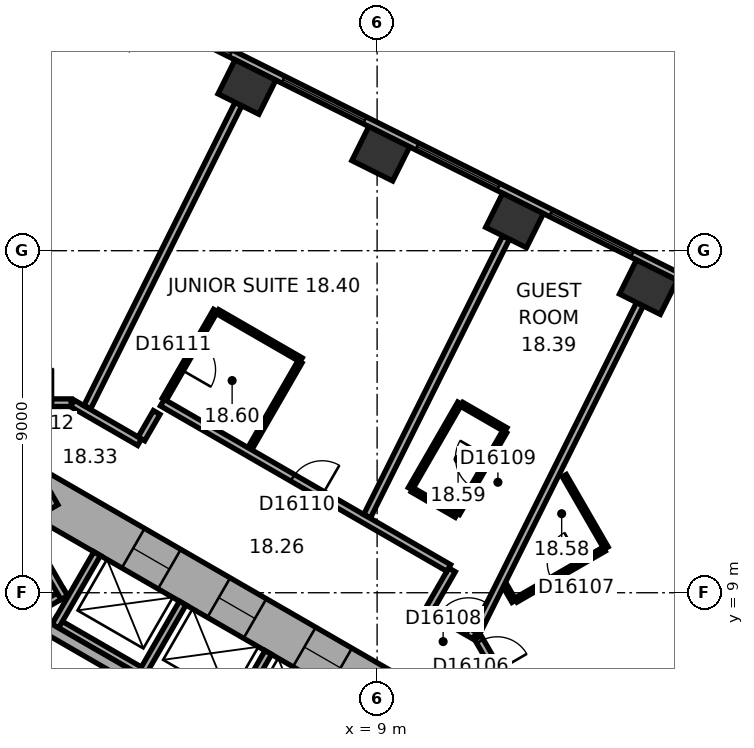
"""IFC4 building model, lengths in metres.
Left out: names, types, materials, properties, quantities, classifications, styles, units other than length and angle.
Written with IfcOpenShell. Run it as: python <this file> out.ifc"""

import sys

from ifc_helpers import new_model, si_unit, direction, frame, frame_2d, origin, origin_2d, place, context, subcontext, project, spatial, rectangle, extrude, element, fill, save


model = new_model("IFC4")
c1 = context("Model", 3, precision=1e-05, world=origin(), true_north=direction((0.0, 1.0)))
c2 = subcontext(c1, "Body", "Model", "MODEL_VIEW")
j1 = project(units=[si_unit("LENGTHUNIT", "METRE"), si_unit("PLANEANGLEUNIT", "RADIAN")], contexts=[c1])
p1 = place(None, origin())
s1 = spatial("IfcSite", under=j1, at=p1, CompositionType="ELEMENT")
p2 = place(p1, origin())
s2 = spatial("IfcBuilding", under=s1, at=p2, CompositionType="ELEMENT")
p3 = place(p2, frame((0.0, 0.0, 83.6)))
s3 = spatial("IfcBuildingStorey", under=s2, at=p3, CompositionType="ELEMENT", Elevation=83.6)
for number, where, z_axis, x_axis in (
    (1, (16.138, 17.04, 0.0), (0.0, 0.0, 1.0), (-0.895, 0.446, 0.0)),
    (2, (12.616, 18.795, 0.0), (0.0, 0.0, 1.0), (-0.895, 0.446, 0.0)),
    (3, (9.095, 20.551, 0.0), (0.0, 0.0, 1.0), (-0.895, 0.446, 0.0)),
    (4, (5.574, 22.306, 0.0), (0.0, 0.0, 1.0), (-0.895, 0.446, 0.0)),
):
    element("IfcColumn", number, at=place(p3, frame(where, z_axis=z_axis, x_axis=x_axis)), inside=s3, PredefinedType="COLUMN", context=c2, shape_type="SweptSolid", body=[
        extrude(rectangle(XDim=1.2, YDim=1.0, at=origin_2d()), origin(), (0.0, 0.0, 1.0), 3.3),
    ])
p4 = place(p3, frame((10.4, 5.658, 0.0), z_axis=(0.0, 0.0, 1.0), x_axis=(-0.866021384402, 0.500006961711, 0.0)))
e5 = element("IfcWall", 5, at=p4, inside=s3, PredefinedType="SHEAR", context=c2, shape_type="SweptSolid", body=[
    extrude(rectangle(XDim=12.355, YDim=1.2, at=frame_2d((6.178, 0.0))), origin(), (0.0, 0.0, 1.0), 3.3),
])
p5 = place(p4, frame((2.728, 0.0, 0.0)))
e6 = element("IfcOpeningElement", 6, at=p5, cuts=e5, PredefinedType="OPENING", context=c2, shape_type="SweptSolid", body=[
    extrude(rectangle(XDim=1.1, YDim=2.1, at=frame_2d((0.55, 1.05))), frame((0.0, 0.61, 0.0), z_axis=(0.0, -1.0, 0.0), x_axis=(1.0, 0.0, 0.0)), (0.0, 0.0, 1.0), 1.22),
])
p6 = place(p4, frame((5.328, 0.0, 0.0)))
e7 = element("IfcOpeningElement", 7, at=p6, cuts=e5, PredefinedType="OPENING", context=c2, shape_type="SweptSolid", body=[
    extrude(rectangle(XDim=1.1, YDim=2.1, at=frame_2d((0.55, 1.05))), frame((0.0, 0.61, 0.0), z_axis=(0.0, -1.0, 0.0), x_axis=(1.0, 0.0, 0.0)), (0.0, 0.0, 1.0), 1.22),
])
p7 = place(p4, frame((7.928, 0.0, 0.0)))
e8 = element("IfcOpeningElement", 8, at=p7, cuts=e5, PredefinedType="OPENING", context=c2, shape_type="SweptSolid", body=[
    extrude(rectangle(XDim=1.1, YDim=2.1, at=frame_2d((0.55, 1.05))), frame((0.0, 0.61, 0.0), z_axis=(0.0, -1.0, 0.0), x_axis=(1.0, 0.0, 0.0)), (0.0, 0.0, 1.0), 1.22),
])
p8 = place(p3, frame((0.3, 11.836, 0.0), z_axis=(0.0, 0.0, 1.0), x_axis=(-0.866021384402, -0.500006961711, 0.0)))
e9 = element("IfcWall", 9, at=p8, inside=s3, PredefinedType="SHEAR", context=c2, shape_type="SweptSolid", body=[
    extrude(rectangle(XDim=12.355, YDim=1.2, at=frame_2d((6.178, 0.0))), origin(), (0.0, 0.0, 1.0), 3.3),
])
p9 = place(p8, frame((6.378, 0.0, 0.0)))
e10 = element("IfcOpeningElement", 10, at=p9, cuts=e9, PredefinedType="OPENING", context=c2, shape_type="SweptSolid", body=[
    extrude(rectangle(XDim=1.5, YDim=2.1, at=frame_2d((0.75, 1.05))), frame((0.0, 0.61, 0.0), z_axis=(0.0, -1.0, 0.0), x_axis=(1.0, 0.0, 0.0)), (0.0, 0.0, 1.0), 1.22),
])
p10 = place(p8, frame((1.828, 0.0, 0.0)))
e11 = element("IfcOpeningElement", 11, at=p10, cuts=e9, PredefinedType="OPENING", context=c2, shape_type="SweptSolid", body=[
    extrude(rectangle(XDim=1.1, YDim=2.1, at=frame_2d((0.55, 1.05))), frame((0.0, 0.61, 0.0), z_axis=(0.0, -1.0, 0.0), x_axis=(1.0, 0.0, 0.0)), (0.0, 0.0, 1.0), 1.22),
])
p11 = place(p3, frame((20.63, 15.47, 0.0), z_axis=(0.0, 0.0, 1.0), x_axis=(-0.894934518609, 0.446197498203, 0.0)))
e12 = element("IfcWall", 12, at=p11, inside=s3, PredefinedType="STANDARD", context=c2, shape_type="SweptSolid", body=[
    extrude(rectangle(XDim=21.246, YDim=0.2, at=frame_2d((10.623, 0.0))), origin(), (0.0, 0.0, 1.0), 3.3),
])
p12 = place(p11, frame((1.553, 0.0, 0.8)))
e13 = element("IfcOpeningElement", 13, at=p12, cuts=e12, PredefinedType="OPENING", context=c2, shape_type="SweptSolid", body=[
    extrude(rectangle(XDim=2.4, YDim=1.7, at=frame_2d((1.2, 0.85))), frame((0.0, 0.11, 0.0), z_axis=(0.0, -1.0, 0.0), x_axis=(1.0, 0.0, 0.0)), (0.0, 0.0, 1.0), 0.22),
])
p13 = place(p11, frame((5.488, 0.0, 0.8)))
e14 = element("IfcOpeningElement", 14, at=p13, cuts=e12, PredefinedType="OPENING", context=c2, shape_type="SweptSolid", body=[
    extrude(rectangle(XDim=2.4, YDim=1.7, at=frame_2d((1.2, 0.85))), frame((0.0, 0.11, 0.0), z_axis=(0.0, -1.0, 0.0), x_axis=(1.0, 0.0, 0.0)), (0.0, 0.0, 1.0), 0.22),
])
p14 = place(p11, frame((9.422, 0.0, 0.8)))
e15 = element("IfcOpeningElement", 15, at=p14, cuts=e12, PredefinedType="OPENING", context=c2, shape_type="SweptSolid", body=[
    extrude(rectangle(XDim=2.4, YDim=1.7, at=frame_2d((1.2, 0.85))), frame((0.0, 0.11, 0.0), z_axis=(0.0, -1.0, 0.0), x_axis=(1.0, 0.0, 0.0)), (0.0, 0.0, 1.0), 0.22),
])
p15 = place(p11, frame((13.357, 0.0, 0.8)))
e16 = element("IfcOpeningElement", 16, at=p15, cuts=e12, PredefinedType="OPENING", context=c2, shape_type="SweptSolid", body=[
    extrude(rectangle(XDim=2.4, YDim=1.7, at=frame_2d((1.2, 0.85))), frame((0.0, 0.11, 0.0), z_axis=(0.0, -1.0, 0.0), x_axis=(1.0, 0.0, 0.0)), (0.0, 0.0, 1.0), 0.22),
])
p16 = place(p11, frame((17.292, 0.0, 0.8)))
e17 = element("IfcOpeningElement", 17, at=p16, cuts=e12, PredefinedType="OPENING", context=c2, shape_type="SweptSolid", body=[
    extrude(rectangle(XDim=2.4, YDim=1.7, at=frame_2d((1.2, 0.85))), frame((0.0, 0.11, 0.0), z_axis=(0.0, -1.0, 0.0), x_axis=(1.0, 0.0, 0.0)), (0.0, 0.0, 1.0), 0.22),
])
p17 = place(p3, frame((7.424, 4.259, 0.0), z_axis=(0.0, 0.0, 1.0), x_axis=(-0.866026010844, 0.49999894854, 0.0)))
e18 = element("IfcWall", 18, at=p17, inside=s3, PredefinedType="PARTITIONING", context=c2, shape_type="SweptSolid", body=[
    extrude(rectangle(XDim=8.0, YDim=0.2, at=frame_2d((4.0, 0.0))), origin(), (0.0, 0.0, 1.0), 3.05),
])
for number, where, z_axis, x_axis in (
    (19, (5.036, 5.522, 0.0), (0.0, 0.0, 1.0), (0.5, 0.866, 0.0)),
    (20, (2.784, 6.822, 0.0), (0.0, 0.0, 1.0), (0.5, 0.866, 0.0)),
    (21, (0.532, 8.122, 0.0), (0.0, 0.0, 1.0), (0.5, 0.866, 0.0)),
):
    element("IfcWall", number, at=place(p3, frame(where, z_axis=z_axis, x_axis=x_axis)), inside=s3, PredefinedType="PARTITIONING", context=c2, shape_type="SweptSolid", body=[
        extrude(rectangle(XDim=2.2, YDim=0.2, at=frame_2d((1.1, 0.0))), origin(), (0.0, 0.0, 1.0), 3.05),
    ])
p18 = place(p3, frame((0.803, 9.009, 0.0), z_axis=(0.0, 0.0, 1.0), x_axis=(-0.866028230842, -0.499995103361, 0.0)))
e22 = element("IfcWall", 22, at=p18, inside=s3, PredefinedType="PARTITIONING", context=c2, shape_type="SweptSolid", body=[
    extrude(rectangle(XDim=5.4, YDim=0.2, at=frame_2d((2.7, 0.0))), origin(), (0.0, 0.0, 1.0), 3.05),
])
p19 = place(p3, frame((0.767, 8.872, 0.0), z_axis=(0.0, 0.0, 1.0), x_axis=(-0.499994660107, 0.866028486751, 0.0)))
e23 = element("IfcWall", 23, at=p19, inside=s3, PredefinedType="PARTITIONING", context=c2, shape_type="SweptSolid", body=[
    extrude(rectangle(XDim=2.2, YDim=0.2, at=frame_2d((1.1, 0.0))), origin(), (0.0, 0.0, 1.0), 3.05),
])
p20 = place(p3, frame((6.303, 4.617, 0.0), z_axis=(0.0, 0.0, 1.0), x_axis=(-0.866027801685, 0.499995846692, 0.0)))
e24 = element("IfcWall", 24, at=p20, inside=s3, PredefinedType="SHEAR", context=c2, shape_type="SweptSolid", body=[
    extrude(rectangle(XDim=7.06, YDim=0.3, at=frame_2d((3.53, 0.0))), origin(), (0.0, 0.0, 1.0), 3.05),
])
p21 = place(p3, frame((0.95, 14.001, 0.0), z_axis=(0.0, 0.0, 1.0), x_axis=(-1.0, 0.0, 0.0)))
e25 = element("IfcWall", 25, at=p21, inside=s3, PredefinedType="PARTITIONING", context=c2, shape_type="SweptSolid", body=[
    extrude(rectangle(XDim=1.86, YDim=0.2, at=frame_2d((0.93, 0.0))), origin(), (0.0, 0.0, 1.0), 3.05),
])
p22 = place(p21, frame((0.48, 0.0, 0.0)))
e26 = element("IfcOpeningElement", 26, at=p22, cuts=e25, PredefinedType="OPENING", context=c2, shape_type="SweptSolid", body=[
    extrude(rectangle(XDim=0.9, YDim=2.1, at=frame_2d((0.45, 1.05))), frame((0.0, 0.11, 0.0), z_axis=(0.0, -1.0, 0.0), x_axis=(1.0, 0.0, 0.0)), (0.0, 0.0, 1.0), 0.22),
])
p23 = place(p3, frame((2.748, 12.962, 0.0), z_axis=(0.0, 0.0, 1.0), x_axis=(-0.866013897511, 0.50001992892, 0.0)))
e27 = element("IfcWall", 27, at=p23, inside=s3, PredefinedType="PARTITIONING", context=c2, shape_type="SweptSolid", body=[
    extrude(rectangle(XDim=2.037, YDim=0.2, at=frame_2d((1.018, 0.0))), origin(), (0.0, 0.0, 1.0), 3.05),
])
p24 = place(p3, frame((3.199, 13.743, 0.0), z_axis=(0.0, 0.0, 1.0), x_axis=(-0.500170954823, -0.865926680471, 0.0)))
e28 = element("IfcWall", 28, at=p24, inside=s3, PredefinedType="PARTITIONING", context=c2, shape_type="SweptSolid", body=[
    extrude(rectangle(XDim=0.801, YDim=0.2, at=frame_2d((0.4, 0.0))), origin(), (0.0, 0.0, 1.0), 3.05),
])
p25 = place(p3, frame((3.399, 14.089, 0.0), z_axis=(0.0, 0.0, 1.0), x_axis=(0.4999416173, 0.866059108428, 0.0)))
e29 = element("IfcWall", 29, at=p25, inside=s3, PredefinedType="PARTITIONING", context=c2, shape_type="SweptSolid", body=[
    extrude(rectangle(XDim=2.7, YDim=0.12, at=frame_2d((1.35, 0.0))), origin(), (0.0, 0.0, 1.0), 3.05),
])
p26 = place(p25, frame((0.9, 0.0, 0.0)))
e30 = element("IfcOpeningElement", 30, at=p26, cuts=e29, PredefinedType="OPENING", context=c2, shape_type="SweptSolid", body=[
    extrude(rectangle(XDim=0.9, YDim=2.1, at=frame_2d((0.45, 1.05))), frame((0.0, 0.07, 0.0), z_axis=(0.0, -1.0, 0.0), x_axis=(1.0, 0.0, 0.0)), (0.0, 0.0, 1.0), 0.14),
])
p27 = place(p3, frame((4.801, 16.397, 0.0), z_axis=(0.0, 0.0, 1.0), x_axis=(0.866022320763, -0.500005339912, 0.0)))
e31 = element("IfcWall", 31, at=p27, inside=s3, PredefinedType="PARTITIONING", context=c2, shape_type="SweptSolid", body=[
    extrude(rectangle(XDim=2.54, YDim=0.12, at=frame_2d((1.27, 0.0))), origin(), (0.0, 0.0, 1.0), 3.05),
])
p28 = place(p3, frame((5.351, 21.859, 0.0), z_axis=(0.0, 0.0, 1.0), x_axis=(-0.446205309328, -0.894930624086, 0.0)))
e32 = element("IfcWall", 32, at=p28, inside=s3, PredefinedType="PARTITIONING", context=c2, shape_type="SweptSolid", body=[
    extrude(rectangle(XDim=8.913, YDim=0.2, at=frame_2d((4.457, 0.0))), origin(), (0.0, 0.0, 1.0), 2.6),
])
p29 = place(p3, frame((6.971, 15.075, 0.0), z_axis=(0.0, 0.0, 1.0), x_axis=(-0.500007957085, -0.86602080971, 0.0)))
e33 = element("IfcWall", 33, at=p29, inside=s3, PredefinedType="PARTITIONING", context=c2, shape_type="SweptSolid", body=[
    extrude(rectangle(XDim=2.64, YDim=0.12, at=frame_2d((1.32, 0.0))), origin(), (0.0, 0.0, 1.0), 3.05),
])
p30 = place(p3, frame((9.875, 11.736, 0.0), z_axis=(0.0, 0.0, 1.0), x_axis=(0.499936506574, 0.866062058628, 0.0)))
e34 = element("IfcWall", 34, at=p30, inside=s3, PredefinedType="PARTITIONING", context=c2, shape_type="SweptSolid", body=[
    extrude(rectangle(XDim=2.6, YDim=0.12, at=frame_2d((1.3, 0.0))), origin(), (0.0, 0.0, 1.0), 3.05),
])
p31 = place(p3, frame((10.371, 8.561, 0.0), z_axis=(0.0, 0.0, 1.0), x_axis=(0.499986357472, 0.866033280158, 0.0)))
e35 = element("IfcWall", 35, at=p31, inside=s3, PredefinedType="PARTITIONING", context=c2, shape_type="SweptSolid", body=[
    extrude(rectangle(XDim=1.201, YDim=0.2, at=frame_2d((0.601, 0.0))), origin(), (0.0, 0.0, 1.0), 3.05),
])
p32 = place(p3, frame((10.885, 9.652, 0.0), z_axis=(0.0, 0.0, 1.0), x_axis=(-0.866033277307, 0.499986362411, 0.0)))
e36 = element("IfcWall", 36, at=p32, inside=s3, PredefinedType="PARTITIONING", context=c2, shape_type="SweptSolid", body=[
    extrude(rectangle(XDim=8.702, YDim=0.2, at=frame_2d((4.351, 0.0))), origin(), (0.0, 0.0, 1.0), 3.05),
])
p33 = place(p32, frame((3.844, 0.0, 0.0)))
e37 = element("IfcOpeningElement", 37, at=p33, cuts=e36, PredefinedType="OPENING", context=c2, shape_type="SweptSolid", body=[
    extrude(rectangle(XDim=0.9, YDim=2.1, at=frame_2d((0.45, 1.05))), frame((0.0, 0.11, 0.0), z_axis=(0.0, -1.0, 0.0), x_axis=(1.0, 0.0, 0.0)), (0.0, 0.0, 1.0), 0.22),
])
for number, where, z_axis, x_axis in (
    (38, (11.087, 11.036, 0.0), (0.0, 0.0, 1.0), (-0.866, 0.5, 0.0)),
    (39, (11.226, 13.958, 0.0), (0.0, 0.0, 1.0), (0.866, -0.5, 0.0)),
):
    element("IfcWall", number, at=place(p3, frame(where, z_axis=z_axis, x_axis=x_axis)), inside=s3, PredefinedType="PARTITIONING", context=c2, shape_type="SweptSolid", body=[
        extrude(rectangle(XDim=1.34, YDim=0.12, at=frame_2d((0.67, 0.0))), origin(), (0.0, 0.0, 1.0), 3.05),
    ])
p34 = place(p3, frame((11.566, 7.871, 0.0), z_axis=(0.0, 0.0, 1.0), x_axis=(-0.866004557827, 0.500036104519, 0.0)))
e40 = element("IfcWall", 40, at=p34, inside=s3, PredefinedType="PARTITIONING", context=c2, shape_type="SweptSolid", body=[
    extrude(rectangle(XDim=1.28, YDim=0.2, at=frame_2d((0.64, 0.0))), origin(), (0.0, 0.0, 1.0), 3.05),
])
p35 = place(p34, frame((0.19, 0.0, 0.0)))
e41 = element("IfcOpeningElement", 41, at=p35, cuts=e40, PredefinedType="OPENING", context=c2, shape_type="SweptSolid", body=[
    extrude(rectangle(XDim=0.9, YDim=2.1, at=frame_2d((0.45, 1.05))), frame((0.0, 0.11, 0.0), z_axis=(0.0, -1.0, 0.0), x_axis=(1.0, 0.0, 0.0)), (0.0, 0.0, 1.0), 0.22),
])
p36 = place(p3, frame((12.357, 13.236, 0.0), z_axis=(0.0, 0.0, 1.0), x_axis=(-0.50000366821, -0.866023285932, 0.0)))
e42 = element("IfcWall", 42, at=p36, inside=s3, PredefinedType="PARTITIONING", context=c2, shape_type="SweptSolid", body=[
    extrude(rectangle(XDim=2.48, YDim=0.12, at=frame_2d((1.24, 0.0))), origin(), (0.0, 0.0, 1.0), 3.05),
])
p37 = place(p36, frame((0.79, 0.0, 0.0)))
e43 = element("IfcOpeningElement", 43, at=p37, cuts=e42, PredefinedType="OPENING", context=c2, shape_type="SweptSolid", body=[
    extrude(rectangle(XDim=0.9, YDim=2.1, at=frame_2d((0.45, 1.05))), frame((0.0, 0.07, 0.0), z_axis=(0.0, -1.0, 0.0), x_axis=(1.0, 0.0, 0.0)), (0.0, 0.0, 1.0), 0.14),
])
p38 = place(p3, frame((12.393, 18.348, 0.0), z_axis=(0.0, 0.0, 1.0), x_axis=(-0.446176022699, -0.894945225569, 0.0)))
e44 = element("IfcWall", 44, at=p38, inside=s3, PredefinedType="PARTITIONING", context=c2, shape_type="SweptSolid", body=[
    extrude(rectangle(XDim=8.191, YDim=0.2, at=frame_2d((4.095, 0.0))), origin(), (0.0, 0.0, 1.0), 2.6),
])
p39 = place(p3, frame((12.58, 6.212, 0.0), z_axis=(0.0, 0.0, 1.0), x_axis=(-0.500063286585, 0.865988862174, 0.0)))
e45 = element("IfcWall", 45, at=p39, inside=s3, PredefinedType="PARTITIONING", context=c2, shape_type="SweptSolid", body=[
    extrude(rectangle(XDim=1.86, YDim=0.2, at=frame_2d((0.93, 0.0))), origin(), (0.0, 0.0, 1.0), 3.05),
])
p40 = place(p39, frame((0.842, 0.0, 0.0)))
e46 = element("IfcOpeningElement", 46, at=p40, cuts=e45, PredefinedType="OPENING", context=c2, shape_type="SweptSolid", body=[
    extrude(rectangle(XDim=0.9, YDim=2.1, at=frame_2d((0.45, 1.05))), frame((0.0, 0.11, 0.0), z_axis=(0.0, -1.0, 0.0), x_axis=(1.0, 0.0, 0.0)), (0.0, 0.0, 1.0), 0.22),
])
p41 = place(p3, frame((12.601, 8.776, 0.0), z_axis=(0.0, 0.0, 1.0), x_axis=(-0.500166486798, 0.865929261247, 0.0)))
e47 = element("IfcWall", 47, at=p41, inside=s3, PredefinedType="PARTITIONING", context=c2, shape_type="SweptSolid", body=[
    extrude(rectangle(XDim=0.476, YDim=0.12, at=frame_2d((0.238, 0.0))), origin(), (0.0, 0.0, 1.0), 3.05),
])
p42 = place(p3, frame((13.926, 12.081, 0.0), z_axis=(0.0, 0.0, 1.0), x_axis=(0.499994660107, -0.866028486751, 0.0)))
e48 = element("IfcWall", 48, at=p42, inside=s3, PredefinedType="PARTITIONING", context=c2, shape_type="SweptSolid", body=[
    extrude(rectangle(XDim=2.2, YDim=0.12, at=frame_2d((1.1, 0.0))), origin(), (0.0, 0.0, 1.0), 3.05),
])
p43 = place(p3, frame((14.974, 10.146, 0.0), z_axis=(0.0, 0.0, 1.0), x_axis=(-0.86599746015, -0.500048396672, 0.0)))
e49 = element("IfcWall", 49, at=p43, inside=s3, PredefinedType="PARTITIONING", context=c2, shape_type="SweptSolid", body=[
    extrude(rectangle(XDim=2.68, YDim=0.12, at=frame_2d((1.34, 0.0))), origin(), (0.0, 0.0, 1.0), 3.05),
])
p44 = place(p43, frame((0.69, 0.0, 0.0)))
e50 = element("IfcOpeningElement", 50, at=p44, cuts=e49, PredefinedType="OPENING", context=c2, shape_type="SweptSolid", body=[
    extrude(rectangle(XDim=0.9, YDim=2.1, at=frame_2d((0.45, 1.05))), frame((0.0, 0.07, 0.0), z_axis=(0.0, -1.0, 0.0), x_axis=(1.0, 0.0, 0.0)), (0.0, 0.0, 1.0), 0.14),
])
p45 = place(p3, frame((15.915, 16.592, 0.0), z_axis=(0.0, 0.0, 1.0), x_axis=(-0.446199736347, -0.894933402709, 0.0)))
e51 = element("IfcWall", 51, at=p45, inside=s3, PredefinedType="PARTITIONING", context=c2, shape_type="SweptSolid", body=[
    extrude(rectangle(XDim=9.635, YDim=0.2, at=frame_2d((4.817, 0.0))), origin(), (0.0, 0.0, 1.0), 3.05),
])
p46 = place(p13, origin())
e52 = element("IfcWindow", 52, at=p46, inside=s3, PartitioningType="SINGLE_PANEL", PredefinedType="WINDOW", context=c2, shape_type="SweptSolid", body=[
    extrude(rectangle(XDim=2.4, YDim=1.7, at=frame_2d((1.2, 0.85))), frame((0.0, 0.03, 0.0), z_axis=(0.0, -1.0, 0.0), x_axis=(1.0, 0.0, 0.0)), (0.0, 0.0, 1.0), 0.06),
])
fill(e14, e52)
p47 = place(p14, origin())
e53 = element("IfcWindow", 53, at=p47, inside=s3, PartitioningType="SINGLE_PANEL", PredefinedType="WINDOW", context=c2, shape_type="SweptSolid", body=[
    extrude(rectangle(XDim=2.4, YDim=1.7, at=frame_2d((1.2, 0.85))), frame((0.0, 0.03, 0.0), z_axis=(0.0, -1.0, 0.0), x_axis=(1.0, 0.0, 0.0)), (0.0, 0.0, 1.0), 0.06),
])
fill(e15, e53)
p48 = place(p15, origin())
e54 = element("IfcWindow", 54, at=p48, inside=s3, PartitioningType="SINGLE_PANEL", PredefinedType="WINDOW", context=c2, shape_type="SweptSolid", body=[
    extrude(rectangle(XDim=2.4, YDim=1.7, at=frame_2d((1.2, 0.85))), frame((0.0, 0.03, 0.0), z_axis=(0.0, -1.0, 0.0), x_axis=(1.0, 0.0, 0.0)), (0.0, 0.0, 1.0), 0.06),
])
fill(e16, e54)
p49 = place(p16, origin())
e55 = element("IfcWindow", 55, at=p49, inside=s3, PartitioningType="SINGLE_PANEL", PredefinedType="WINDOW", context=c2, shape_type="SweptSolid", body=[
    extrude(rectangle(XDim=2.4, YDim=1.7, at=frame_2d((1.2, 0.85))), frame((0.0, 0.03, 0.0), z_axis=(0.0, -1.0, 0.0), x_axis=(1.0, 0.0, 0.0)), (0.0, 0.0, 1.0), 0.06),
])
fill(e17, e55)
p50 = place(p5, origin())
e56 = element("IfcDoor", 56, at=p50, inside=s3, OperationType="DOUBLE_DOOR_SLIDING", PredefinedType="DOOR", context=c2, shape_type="SweptSolid", body=[
    extrude(rectangle(XDim=1.1, YDim=2.1, at=frame_2d((0.55, 1.05))), frame((0.0, 0.025, 0.0), z_axis=(0.0, -1.0, 0.0), x_axis=(1.0, 0.0, 0.0)), (0.0, 0.0, 1.0), 0.05),
])
fill(e6, e56)
p51 = place(p6, origin())
e57 = element("IfcDoor", 57, at=p51, inside=s3, OperationType="DOUBLE_DOOR_SLIDING", PredefinedType="DOOR", context=c2, shape_type="SweptSolid", body=[
    extrude(rectangle(XDim=1.1, YDim=2.1, at=frame_2d((0.55, 1.05))), frame((0.0, 0.025, 0.0), z_axis=(0.0, -1.0, 0.0), x_axis=(1.0, 0.0, 0.0)), (0.0, 0.0, 1.0), 0.05),
])
fill(e7, e57)
p52 = place(p7, origin())
e58 = element("IfcDoor", 58, at=p52, inside=s3, OperationType="DOUBLE_DOOR_SLIDING", PredefinedType="DOOR", context=c2, shape_type="SweptSolid", body=[
    extrude(rectangle(XDim=1.1, YDim=2.1, at=frame_2d((0.55, 1.05))), frame((0.0, 0.025, 0.0), z_axis=(0.0, -1.0, 0.0), x_axis=(1.0, 0.0, 0.0)), (0.0, 0.0, 1.0), 0.05),
])
fill(e8, e58)
p53 = place(p40, origin())
e59 = element("IfcDoor", 59, at=p53, inside=s3, OperationType="SINGLE_SWING_LEFT", PredefinedType="DOOR", context=c2, shape_type="SweptSolid", body=[
    extrude(rectangle(XDim=0.9, YDim=2.1, at=frame_2d((0.45, 1.05))), frame((0.0, 0.025, 0.0), z_axis=(0.0, -1.0, 0.0), x_axis=(1.0, 0.0, 0.0)), (0.0, 0.0, 1.0), 0.05),
])
fill(e46, e59)
p54 = place(p44, origin())
e60 = element("IfcDoor", 60, at=p54, inside=s3, OperationType="SINGLE_SWING_LEFT", PredefinedType="DOOR", context=c2, shape_type="SweptSolid", body=[
    extrude(rectangle(XDim=0.9, YDim=2.1, at=frame_2d((0.45, 1.05))), frame((0.0, 0.025, 0.0), z_axis=(0.0, -1.0, 0.0), x_axis=(1.0, 0.0, 0.0)), (0.0, 0.0, 1.0), 0.05),
])
fill(e50, e60)
p55 = place(p35, origin())
e61 = element("IfcDoor", 61, at=p55, inside=s3, OperationType="SINGLE_SWING_LEFT", PredefinedType="DOOR", context=c2, shape_type="SweptSolid", body=[
    extrude(rectangle(XDim=0.9, YDim=2.1, at=frame_2d((0.45, 1.05))), frame((0.0, 0.025, 0.0), z_axis=(0.0, -1.0, 0.0), x_axis=(1.0, 0.0, 0.0)), (0.0, 0.0, 1.0), 0.05),
])
fill(e41, e61)
p56 = place(p37, origin())
e62 = element("IfcDoor", 62, at=p56, inside=s3, OperationType="SINGLE_SWING_LEFT", PredefinedType="DOOR", context=c2, shape_type="SweptSolid", body=[
    extrude(rectangle(XDim=0.9, YDim=2.1, at=frame_2d((0.45, 1.05))), frame((0.0, 0.025, 0.0), z_axis=(0.0, -1.0, 0.0), x_axis=(1.0, 0.0, 0.0)), (0.0, 0.0, 1.0), 0.05),
])
fill(e43, e62)
p57 = place(p33, origin())
e63 = element("IfcDoor", 63, at=p57, inside=s3, OperationType="SINGLE_SWING_LEFT", PredefinedType="DOOR", context=c2, shape_type="SweptSolid", body=[
    extrude(rectangle(XDim=0.9, YDim=2.1, at=frame_2d((0.45, 1.05))), frame((0.0, 0.025, 0.0), z_axis=(0.0, -1.0, 0.0), x_axis=(1.0, 0.0, 0.0)), (0.0, 0.0, 1.0), 0.05),
])
fill(e37, e63)
p58 = place(p26, origin())
e64 = element("IfcDoor", 64, at=p58, inside=s3, OperationType="SINGLE_SWING_LEFT", PredefinedType="DOOR", context=c2, shape_type="SweptSolid", body=[
    extrude(rectangle(XDim=0.9, YDim=2.1, at=frame_2d((0.45, 1.05))), frame((0.0, 0.025, 0.0), z_axis=(0.0, -1.0, 0.0), x_axis=(1.0, 0.0, 0.0)), (0.0, 0.0, 1.0), 0.05),
])
fill(e30, e64)
p59 = place(p22, origin())
e65 = element("IfcDoor", 65, at=p59, inside=s3, OperationType="SINGLE_SWING_LEFT", PredefinedType="DOOR", context=c2, shape_type="SweptSolid", body=[
    extrude(rectangle(XDim=0.9, YDim=2.1, at=frame_2d((0.45, 1.05))), frame((0.0, 0.025, 0.0), z_axis=(0.0, -1.0, 0.0), x_axis=(1.0, 0.0, 0.0)), (0.0, 0.0, 1.0), 0.05),
])
fill(e26, e65)
save(model, sys.argv[1])
